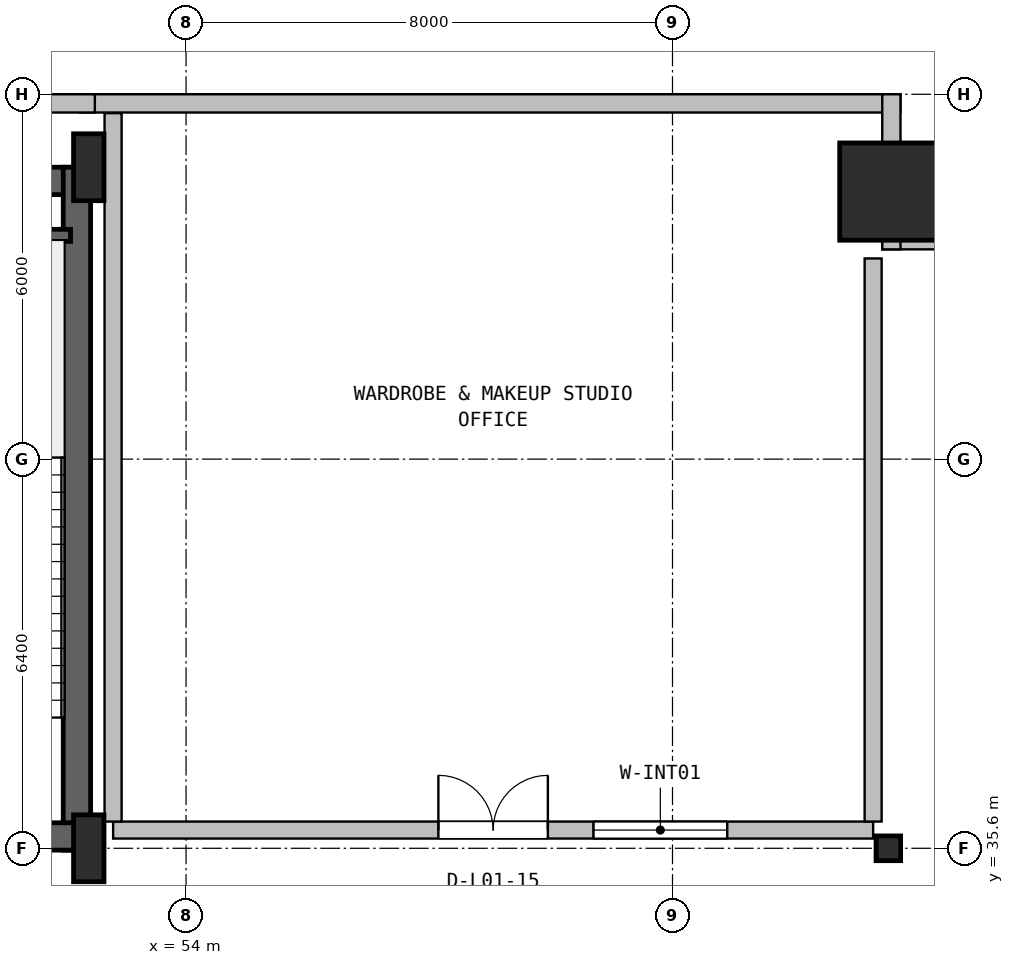
"""IFC4 building model, lengths in metres.
Left out: names, types, materials, properties, quantities, classifications, styles, units other than length and angle.
Written with IfcOpenShell. Run it as: python <this file> out.ifc"""

import sys

from ifc_helpers import new_model, si_unit, direction, frame, frame_2d, origin, origin_2d, place, context, subcontext, project, spatial, rectangle, hollow_rectangle, i_section, extrude, source, transform, mapped, element, fill, save


model = new_model("IFC4")
c1 = context("Model", 3, precision=1e-05, world=origin(), true_north=direction((0.0, 1.0)))
c2 = subcontext(c1, "Body", "Model", "MODEL_VIEW")
j1 = project(units=[si_unit("LENGTHUNIT", "METRE"), si_unit("PLANEANGLEUNIT", "RADIAN")], contexts=[c1])
p1 = place(None, origin())
s1 = spatial("IfcSite", under=j1, at=p1, CompositionType="ELEMENT")
p2 = place(p1, origin())
s2 = spatial("IfcBuilding", under=s1, at=p2, CompositionType="ELEMENT")
p3 = place(p2, frame((0.0, 0.0, 6.0)))
s3 = spatial("IfcBuildingStorey", under=s2, at=p3, CompositionType="ELEMENT", Elevation=6.0)
p4 = place(p3, frame((15.6, 46.575, 0.0), z_axis=(0.0, 0.0, 1.0), x_axis=(1.0, 0.0, 0.0)))
e1 = element("IfcWall", 1, at=p4, inside=s3, PredefinedType="SHEAR", context=c2, shape_type="SweptSolid", body=[
    extrude(rectangle(XDim=36.8, YDim=0.45, at=frame_2d((18.4, 0.0))), origin(), (0.0, 0.0, 1.0), 5.12),
])
p5 = place(p3, frame((52.205, 35.57, 0.0), z_axis=(0.0, 0.0, 1.0), x_axis=(0.0, 1.0, 0.0)))
e2 = element("IfcWall", 2, at=p5, inside=s3, PredefinedType="SHEAR", context=c2, shape_type="SweptSolid", body=[
    extrude(rectangle(XDim=11.23, YDim=0.45, at=frame_2d((5.615, 0.0))), origin(), (0.0, 0.0, 1.0), 5.12),
])
p6 = place(p3, frame((43.2, 35.795, 0.0), z_axis=(0.0, 0.0, 1.0), x_axis=(1.0, 0.0, 0.0)))
e3 = element("IfcWall", 3, at=p6, inside=s3, PredefinedType="SHEAR", context=c2, shape_type="SweptSolid", body=[
    extrude(rectangle(XDim=9.23, YDim=0.45, at=frame_2d((4.615, 0.0))), origin(), (0.0, 0.0, 1.0), 5.12),
])
p7 = place(p6, frame((6.25, 0.0, 0.0)))
e4 = element("IfcOpeningElement", 4, at=p7, cuts=e3, PredefinedType="OPENING", context=c2, shape_type="SweptSolid", body=[
    extrude(rectangle(XDim=0.95, YDim=2.1, at=frame_2d((0.475, 1.05))), frame((0.0, 0.235, 0.0), z_axis=(0.0, -1.0, 0.0), x_axis=(1.0, 0.0, 0.0)), (0.0, 0.0, 1.0), 0.47),
])
m1 = source(origin(), c2, "Body", "SweptSolid", [
    extrude(i_section(OverallWidth=0.5, OverallDepth=1.1, WebThickness=0.018, FlangeThickness=0.032, FilletRadius=0.018, at=origin_2d()), origin(), (0.0, 0.0, 1.0), 5.4),
])
for number, where, z_axis, x_axis in (
    (5, (52.4, 35.6, 0.0), (0.0, 0.0, 1.0), (1.0, 0.0, 0.0)),
    (6, (52.4, 46.8, 0.0), (0.0, 0.0, 1.0), (1.0, 0.0, 0.0)),
):
    element("IfcColumn", number, at=place(p3, frame(where, z_axis=z_axis, x_axis=x_axis)), inside=s3, PredefinedType="COLUMN", context=c2, shape_type="MappedRepresentation", body=[
        mapped(m1, transform((0.0, 0.0, 0.0), x_axis=(1.0, 0.0, 0.0), y_axis=(0.0, 1.0, 0.0), z_axis=(0.0, 0.0, 1.0), scale=1.0)),
    ])
m2 = source(origin(), c2, "Body", "SweptSolid", [
    extrude(hollow_rectangle(XDim=1.6, YDim=1.6, WallThickness=0.06, at=origin_2d()), origin(), (0.0, 0.0, 1.0), 5.4),
])
p8 = place(p3, frame((65.55, 46.4, 0.0), z_axis=(0.0, 0.0, 1.0), x_axis=(1.0, 0.0, 0.0)))
e7 = element("IfcColumn", 7, at=p8, inside=s3, PredefinedType="COLUMN", context=c2, shape_type="MappedRepresentation", body=[
    mapped(m2, transform((0.0, 0.0, 0.0), x_axis=(1.0, 0.0, 0.0), y_axis=(0.0, 1.0, 0.0), z_axis=(0.0, 0.0, 1.0), scale=1.0)),
])
m3 = source(origin(), c2, "Body", "SweptSolid", [
    extrude(i_section(OverallWidth=0.404, OverallDepth=0.407, WebThickness=0.027, FlangeThickness=0.044, FilletRadius=0.018, at=origin_2d()), origin(), (0.0, 0.0, 1.0), 5.4),
])
p9 = place(p3, frame((65.55, 35.6, 0.0), z_axis=(0.0, 0.0, 1.0), x_axis=(1.0, 0.0, 0.0)))
e8 = element("IfcColumn", 8, at=p9, inside=s3, PredefinedType="COLUMN", context=c2, shape_type="MappedRepresentation", body=[
    mapped(m3, transform((0.0, 0.0, 0.0), x_axis=(1.0, 0.0, 0.0), y_axis=(0.0, 1.0, 0.0), z_axis=(0.0, 0.0, 1.0), scale=1.0)),
])
p10 = place(p3, frame((52.25, 47.85, 0.0), z_axis=(0.0, 0.0, 1.0), x_axis=(1.0, 0.0, 0.0)))
e9 = element("IfcWall", 9, at=p10, inside=s3, PredefinedType="SOLIDWALL", context=c2, shape_type="SweptSolid", body=[
    extrude(rectangle(XDim=13.5, YDim=0.3, at=frame_2d((6.75, 0.0))), origin(), (0.0, 0.0, 1.0), 5.1),
])
p11 = place(p3, frame((15.5, 47.85, 0.0), z_axis=(0.0, 0.0, 1.0), x_axis=(1.0, 0.0, 0.0)))
e10 = element("IfcWall", 10, at=p11, inside=s3, PredefinedType="SOLIDWALL", context=c2, shape_type="SweptSolid", body=[
    extrude(rectangle(XDim=37.0, YDim=0.3, at=frame_2d((18.5, 0.0))), origin(), (0.0, 0.0, 1.0), 5.1),
])
for number, where, z_axis, x_axis in (
    (11, (65.45, 45.6, 0.0), (0.0, 0.0, 1.0), (1.0, 0.0, 0.0)),
    (12, (65.6, 45.45, 0.0), (0.0, 0.0, 1.0), (0.0, 1.0, 0.0)),
):
    element("IfcWall", number, at=place(p3, frame(where, z_axis=z_axis, x_axis=x_axis)), inside=s3, PredefinedType="SOLIDWALL", context=c2, shape_type="SweptSolid", body=[
        extrude(rectangle(XDim=2.55, YDim=0.3, at=frame_2d((1.275, 0.0))), origin(), (0.0, 0.0, 1.0), 4.183),
    ])
p12 = place(p3, frame((48.92, 45.68, 0.0), z_axis=(0.0, 0.0, 1.0), x_axis=(1.0, 0.0, 0.0)))
e13 = element("IfcWall", 13, at=p12, inside=s3, PredefinedType="SHEAR", context=c2, shape_type="SweptSolid", body=[
    extrude(rectangle(XDim=3.18, YDim=0.2, at=frame_2d((1.59, 0.0))), origin(), (0.0, 0.0, 1.0), 5.12),
])
p13 = place(p3, frame((52.8, 35.9, 0.0), z_axis=(0.0, 0.0, 1.0), x_axis=(1.0, 0.0, 0.0)))
e14 = element("IfcWall", 14, at=p13, inside=s3, PredefinedType="SOLIDWALL", context=c2, shape_type="SweptSolid", body=[
    extrude(rectangle(XDim=12.5, YDim=0.28, at=frame_2d((6.25, 0.0))), origin(), (0.0, 0.0, 1.0), 4.183),
])
p14 = place(p13, frame((5.35, 0.0, 0.0)))
e15 = element("IfcOpeningElement", 15, at=p14, cuts=e14, PredefinedType="OPENING", context=c2, shape_type="SweptSolid", body=[
    extrude(rectangle(XDim=1.8, YDim=2.25, at=frame_2d((0.9, 1.125))), frame((0.0, 0.15, 0.0), z_axis=(0.0, -1.0, 0.0), x_axis=(1.0, 0.0, 0.0)), (0.0, 0.0, 1.0), 0.3),
])
p15 = place(p13, frame((7.9, 0.0, 0.95)))
e16 = element("IfcOpeningElement", 16, at=p15, cuts=e14, PredefinedType="OPENING", context=c2, shape_type="SweptSolid", body=[
    extrude(rectangle(XDim=2.2, YDim=1.3, at=frame_2d((1.1, 0.65))), frame((0.0, 0.15, 0.0), z_axis=(0.0, -1.0, 0.0), x_axis=(1.0, 0.0, 0.0)), (0.0, 0.0, 1.0), 0.3),
])
p16 = place(p3, frame((65.3, 36.04, 0.0), z_axis=(0.0, 0.0, 1.0), x_axis=(0.0, 1.0, 0.0)))
e17 = element("IfcWall", 17, at=p16, inside=s3, PredefinedType="SOLIDWALL", context=c2, shape_type="SweptSolid", body=[
    extrude(rectangle(XDim=9.26, YDim=0.28, at=frame_2d((4.63, 0.0))), origin(), (0.0, 0.0, 1.0), 4.183),
])
p17 = place(p3, frame((52.8, 36.04, 0.0), z_axis=(0.0, 0.0, 1.0), x_axis=(0.0, 1.0, 0.0)))
e18 = element("IfcWall", 18, at=p17, inside=s3, PredefinedType="SOLIDWALL", context=c2, shape_type="SweptSolid", body=[
    extrude(rectangle(XDim=11.65, YDim=0.28, at=frame_2d((5.825, 0.0))), origin(), (0.0, 0.0, 1.0), 4.183),
])
m4 = source(origin(), c2, "Body", "SweptSolid", [
    extrude(rectangle(XDim=1.8, YDim=2.25, at=frame_2d((0.9, 1.125))), frame((0.0, 0.025, 0.0), z_axis=(0.0, -1.0, 0.0), x_axis=(1.0, 0.0, 0.0)), (0.0, 0.0, 1.0), 0.05),
])
p18 = place(p14, origin())
e19 = element("IfcDoor", 19, at=p18, inside=s3, OperationType="DOUBLE_DOOR_SINGLE_SWING", PredefinedType="DOOR", context=c2, shape_type="MappedRepresentation", body=[
    mapped(m4, transform((0.0, 0.0, 0.0), x_axis=(1.0, 0.0, 0.0), y_axis=(0.0, 1.0, 0.0), z_axis=(0.0, 0.0, 1.0), scale=1.0)),
])
fill(e15, e19)
m5 = source(origin(), c2, "Body", "SweptSolid", [
    extrude(rectangle(XDim=2.2, YDim=1.3, at=frame_2d((1.1, 0.65))), frame((0.0, 0.03, 0.0), z_axis=(0.0, -1.0, 0.0), x_axis=(1.0, 0.0, 0.0)), (0.0, 0.0, 1.0), 0.06),
])
p19 = place(p15, origin())
e20 = element("IfcWindow", 20, at=p19, inside=s3, PartitioningType="SINGLE_PANEL", PredefinedType="WINDOW", context=c2, shape_type="MappedRepresentation", body=[
    mapped(m5, transform((0.0, 0.0, 0.0), x_axis=(1.0, 0.0, 0.0), y_axis=(0.0, 1.0, 0.0), z_axis=(0.0, 0.0, 1.0), scale=1.0)),
])
fill(e16, e20)
save(model, sys.argv[1])
